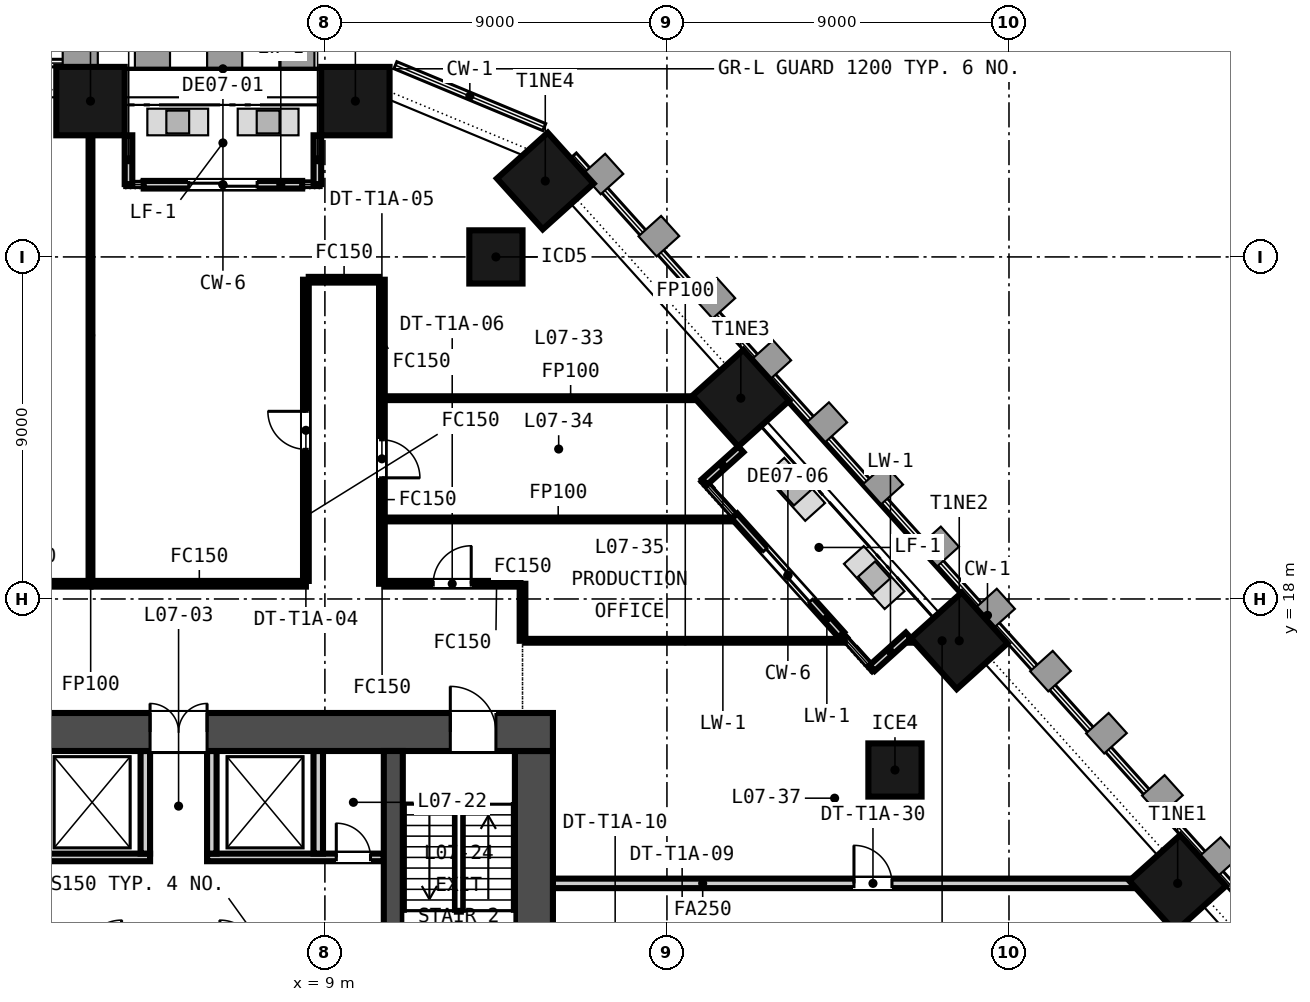
"""IFC4 building model, lengths in metres.
Left out: names, types, materials, properties, quantities, classifications, styles, units other than length and angle.
Written with IfcOpenShell. Run it as: python <this file> out.ifc"""

import sys

from ifc_helpers import new_model, si_unit, direction, frame, frame_2d, origin, origin_2d, place, context, subcontext, project, spatial, rectangle, extrude, element, fill, save


model = new_model("IFC4")
c1 = context("Model", 3, precision=1e-05, world=origin(), true_north=direction((0.0, 1.0)))
c2 = subcontext(c1, "Body", "Model", "MODEL_VIEW")
j1 = project(units=[si_unit("LENGTHUNIT", "METRE"), si_unit("PLANEANGLEUNIT", "RADIAN")], contexts=[c1])
p1 = place(None, origin())
s1 = spatial("IfcSite", under=j1, at=p1, CompositionType="ELEMENT")
p2 = place(p1, origin())
s2 = spatial("IfcBuilding", under=s1, at=p2, CompositionType="ELEMENT")
p3 = place(p2, frame((0.0, 0.0, 39.65)))
s3 = spatial("IfcBuildingStorey", under=s2, at=p3, CompositionType="ELEMENT", Elevation=39.65)
p4 = place(p3, frame((-15.0, 14.5, -0.15), z_axis=(0.0, 0.0, 1.0), x_axis=(1.0, 0.0, 0.0)))
e1 = element("IfcWall", 1, at=p4, inside=s3, PredefinedType="SOLIDWALL", context=c2, shape_type="SweptSolid", body=[
    extrude(rectangle(XDim=30.0, YDim=1.0, at=frame_2d((15.0, 0.0))), origin(), (0.0, 0.0, 1.0), 3.65),
])
p5 = place(p4, frame((9.25, 0.0, 0.15)))
e2 = element("IfcOpeningElement", 2, at=p5, cuts=e1, PredefinedType="OPENING", context=c2, shape_type="SweptSolid", body=[
    extrude(rectangle(XDim=1.5, YDim=2.1, at=frame_2d((0.75, 1.05))), frame((0.0, 0.51, 0.0), z_axis=(0.0, -1.0, 0.0), x_axis=(1.0, 0.0, 0.0)), (0.0, 0.0, 1.0), 1.02),
])
p6 = place(p4, frame((19.4, 0.0, 0.15)))
e3 = element("IfcOpeningElement", 3, at=p6, cuts=e1, PredefinedType="OPENING", context=c2, shape_type="SweptSolid", body=[
    extrude(rectangle(XDim=1.5, YDim=2.1, at=frame_2d((0.75, 1.05))), frame((0.0, 0.51, 0.0), z_axis=(0.0, -1.0, 0.0), x_axis=(1.0, 0.0, 0.0)), (0.0, 0.0, 1.0), 1.02),
])
p7 = place(p4, frame((1.5, 0.0, 0.15)))
e4 = element("IfcOpeningElement", 4, at=p7, cuts=e1, PredefinedType="OPENING", context=c2, shape_type="SweptSolid", body=[
    extrude(rectangle(XDim=1.2, YDim=2.1, at=frame_2d((0.6, 1.05))), frame((0.0, 0.51, 0.0), z_axis=(0.0, -1.0, 0.0), x_axis=(1.0, 0.0, 0.0)), (0.0, 0.0, 1.0), 1.02),
])
p8 = place(p4, frame((27.3, 0.0, 0.15)))
e5 = element("IfcOpeningElement", 5, at=p8, cuts=e1, PredefinedType="OPENING", context=c2, shape_type="SweptSolid", body=[
    extrude(rectangle(XDim=1.2, YDim=2.1, at=frame_2d((0.6, 1.05))), frame((0.0, 0.51, 0.0), z_axis=(0.0, -1.0, 0.0), x_axis=(1.0, 0.0, 0.0)), (0.0, 0.0, 1.0), 1.02),
])
p9 = place(p3, frame((14.5, 1.0, -0.15), z_axis=(0.0, 0.0, 1.0), x_axis=(0.0, 1.0, 0.0)))
e6 = element("IfcWall", 6, at=p9, inside=s3, PredefinedType="SOLIDWALL", context=c2, shape_type="SweptSolid", body=[
    extrude(rectangle(XDim=13.0, YDim=1.0, at=frame_2d((6.5, 0.0))), origin(), (0.0, 0.0, 1.0), 3.65),
])
p10 = place(p3, frame((10.8, 1.0, -0.15), z_axis=(0.0, 0.0, 1.0), x_axis=(0.0, 1.0, 0.0)))
e7 = element("IfcWall", 7, at=p10, inside=s3, PredefinedType="SOLIDWALL", context=c2, shape_type="SweptSolid", body=[
    extrude(rectangle(XDim=13.0, YDim=0.5, at=frame_2d((6.5, 0.0))), origin(), (0.0, 0.0, 1.0), 3.65),
])
for number, where, z_axis, x_axis in (
    (8, (9.802, 31.1, -0.15), (0.0, 0.0, 1.0), (-1.0, 0.0, 0.0)),
    (9, (2.832, 31.1, -0.15), (0.0, 0.0, 1.0), (-1.0, 0.0, 0.0)),
    (10, (31.438, 10.517, -0.15), (0.0, 0.0, 1.0), (-0.669, 0.743, 0.0)),
    (11, (25.691, 16.9, -0.15), (0.0, 0.0, 1.0), (-0.669, 0.743, 0.0)),
    (12, (19.944, 23.283, -0.15), (0.0, 0.0, 1.0), (-0.669, 0.743, 0.0)),
    (13, (14.799, 28.998, -0.15), (0.0, 0.0, 1.0), (-0.669, 0.743, 0.0)),
):
    element("IfcColumn", number, at=place(p3, frame(where, z_axis=z_axis, x_axis=x_axis)), inside=s3, PredefinedType="COLUMN", context=c2, shape_type="SweptSolid", body=[
        extrude(rectangle(XDim=1.8, YDim=1.8, at=origin_2d()), origin(), (0.0, 0.0, 1.0), 3.65),
    ])
for number, where, z_axis, x_axis in (
    (14, (13.5, 27.0, -0.15), (0.0, 0.0, 1.0), (1.0, 0.0, 0.0)),
    (15, (24.0, 13.5, -0.15), (0.0, 0.0, 1.0), (1.0, 0.0, 0.0)),
):
    element("IfcColumn", number, at=place(p3, frame(where, z_axis=z_axis, x_axis=x_axis)), inside=s3, PredefinedType="COLUMN", context=c2, shape_type="SweptSolid", body=[
        extrude(rectangle(XDim=1.4, YDim=1.4, at=origin_2d()), origin(), (0.0, 0.0, 1.0), 3.65),
    ])
p11 = place(p3, frame((8.402, 28.9, 0.0), z_axis=(0.0, 0.0, 1.0), x_axis=(-1.0, 0.0, 0.0)))
e16 = element("IfcWall", 16, at=p11, inside=s3, PredefinedType="SOLIDWALL", context=c2, shape_type="SweptSolid", body=[
    extrude(rectangle(XDim=4.169, YDim=0.2, at=frame_2d((2.085, 0.0))), origin(), (0.0, 0.0, 1.0), 3.049),
])
p12 = place(p11, frame((1.185, 0.0, 0.0)))
e17 = element("IfcOpeningElement", 17, at=p12, cuts=e16, PredefinedType="OPENING", context=c2, shape_type="SweptSolid", body=[
    extrude(rectangle(XDim=1.8, YDim=2.4, at=frame_2d((0.9, 1.2))), frame((0.0, 0.11, 0.0), z_axis=(0.0, -1.0, 0.0), x_axis=(1.0, 0.0, 0.0)), (0.0, 0.0, 1.0), 0.22),
])
for number, where, z_axis, x_axis in (
    (18, (8.802, 30.2, 0.0), (0.0, 0.0, 1.0), (0.0, -1.0, 0.0)),
    (19, (3.832, 30.2, 0.0), (0.0, 0.0, 1.0), (0.0, -1.0, 0.0)),
):
    element("IfcWall", number, at=place(p3, frame(where, z_axis=z_axis, x_axis=x_axis)), inside=s3, PredefinedType="SOLIDWALL", context=c2, shape_type="SweptSolid", body=[
        extrude(rectangle(XDim=1.284, YDim=0.2, at=frame_2d((0.642, 0.0))), origin(), (0.0, 0.0, 1.0), 3.05),
    ])
p13 = place(p3, frame((22.588, 17.059, 0.0), z_axis=(0.0, 0.0, 1.0), x_axis=(-0.669138140895, 0.743138041282, 0.0)))
e20 = element("IfcWall", 20, at=p13, inside=s3, PredefinedType="SOLIDWALL", context=c2, shape_type="SweptSolid", body=[
    extrude(rectangle(XDim=4.2, YDim=0.2, at=frame_2d((2.1, 0.0))), origin(), (0.0, 0.0, 1.0), 3.05),
])
p14 = place(p13, frame((1.2, 0.0, 0.0)))
e21 = element("IfcOpeningElement", 21, at=p14, cuts=e20, PredefinedType="OPENING", context=c2, shape_type="SweptSolid", body=[
    extrude(rectangle(XDim=1.8, YDim=2.4, at=frame_2d((0.9, 1.2))), frame((0.0, 0.11, 0.0), z_axis=(0.0, -1.0, 0.0), x_axis=(1.0, 0.0, 0.0)), (0.0, 0.0, 1.0), 0.22),
])
p15 = place(p3, frame((24.353, 17.041, 0.0), z_axis=(0.0, 0.0, 1.0), x_axis=(-0.743123928629, -0.669153813932, 0.0)))
e22 = element("IfcWall", 22, at=p15, inside=s3, PredefinedType="SOLIDWALL", context=c2, shape_type="SweptSolid", body=[
    extrude(rectangle(XDim=1.284, YDim=0.2, at=frame_2d((0.642, 0.0))), origin(), (0.0, 0.0, 1.0), 2.821),
])
p16 = place(p3, frame((19.944, 21.938, 0.0), z_axis=(0.0, 0.0, 1.0), x_axis=(-0.743029376197, -0.669258803535, 0.0)))
e23 = element("IfcWall", 23, at=p16, inside=s3, PredefinedType="SOLIDWALL", context=c2, shape_type="SweptSolid", body=[
    extrude(rectangle(XDim=1.284, YDim=0.2, at=frame_2d((0.642, 0.0))), origin(), (0.0, 0.0, 1.0), 3.05),
])
p17 = place(p3, frame((-4.25, 11.2, 0.0), z_axis=(0.0, 0.0, 1.0), x_axis=(1.0, 0.0, 0.0)))
e24 = element("IfcWall", 24, at=p17, inside=s3, PredefinedType="PARTITIONING", context=c2, shape_type="SweptSolid", body=[
    extrude(rectangle(XDim=8.65, YDim=0.2, at=frame_2d((4.325, 0.0))), origin(), (0.0, 0.0, 1.0), 3.5),
])
p18 = place(p17, frame((0.825, 0.0, 0.0)))
e25 = element("IfcOpeningElement", 25, at=p18, cuts=e24, PredefinedType="OPENING", context=c2, shape_type="SweptSolid", body=[
    extrude(rectangle(XDim=1.4, YDim=2.1, at=frame_2d((0.7, 1.05))), frame((0.0, 0.11, 0.0), z_axis=(0.0, -1.0, 0.0), x_axis=(1.0, 0.0, 0.0)), (0.0, 0.0, 1.0), 0.22),
])
p19 = place(p17, frame((3.625, 0.0, 0.0)))
e26 = element("IfcOpeningElement", 26, at=p19, cuts=e24, PredefinedType="OPENING", context=c2, shape_type="SweptSolid", body=[
    extrude(rectangle(XDim=1.4, YDim=2.1, at=frame_2d((0.7, 1.05))), frame((0.0, 0.11, 0.0), z_axis=(0.0, -1.0, 0.0), x_axis=(1.0, 0.0, 0.0)), (0.0, 0.0, 1.0), 0.22),
])
p20 = place(p3, frame((5.9, 11.2, 0.0), z_axis=(0.0, 0.0, 1.0), x_axis=(1.0, 0.0, 0.0)))
e27 = element("IfcWall", 27, at=p20, inside=s3, PredefinedType="PARTITIONING", context=c2, shape_type="SweptSolid", body=[
    extrude(rectangle(XDim=4.65, YDim=0.2, at=frame_2d((2.325, 0.0))), origin(), (0.0, 0.0, 1.0), 3.5),
])
p21 = place(p20, frame((3.4, 0.0, 0.0)))
e28 = element("IfcOpeningElement", 28, at=p21, cuts=e27, PredefinedType="OPENING", context=c2, shape_type="SweptSolid", body=[
    extrude(rectangle(XDim=0.9, YDim=2.1, at=frame_2d((0.45, 1.05))), frame((0.0, 0.11, 0.0), z_axis=(0.0, -1.0, 0.0), x_axis=(1.0, 0.0, 0.0)), (0.0, 0.0, 1.0), 0.22),
])
for number, where, z_axis, x_axis in (
    (29, (4.275, 11.3, 0.0), (0.0, 0.0, 1.0), (0.0, 1.0, 0.0)),
    (30, (6.025, 11.3, 0.0), (0.0, 0.0, 1.0), (0.0, 1.0, 0.0)),
    (31, (8.825, 11.3, 0.0), (0.0, 0.0, 1.0), (0.0, 1.0, 0.0)),
):
    element("IfcWall", number, at=place(p3, frame(where, z_axis=z_axis, x_axis=x_axis)), inside=s3, PredefinedType="PARTITIONING", context=c2, shape_type="SweptSolid", body=[
        extrude(rectangle(XDim=2.7, YDim=0.25, at=frame_2d((1.35, 0.0))), origin(), (0.0, 0.0, 1.0), 3.5),
    ])
p22 = place(p3, frame((10.5, 26.4, 0.0), z_axis=(0.0, 0.0, 1.0), x_axis=(0.0, -1.0, 0.0)))
e32 = element("IfcWall", 32, at=p22, inside=s3, PredefinedType="PARTITIONING", context=c2, shape_type="SweptSolid", body=[
    extrude(rectangle(XDim=3.117, YDim=0.15, at=frame_2d((1.559, 0.0))), origin(), (0.0, 0.0, 1.0), 2.741),
])
p23 = place(p3, frame((10.5, 23.283, 0.0), z_axis=(0.0, 0.0, 1.0), x_axis=(0.0, -1.0, 0.0)))
e33 = element("IfcWall", 33, at=p23, inside=s3, PredefinedType="PARTITIONING", context=c2, shape_type="SweptSolid", body=[
    extrude(rectangle(XDim=3.191, YDim=0.15, at=frame_2d((1.595, 0.0))), origin(), (0.0, 0.0, 1.0), 2.741),
])
p24 = place(p23, frame((1.095, 0.0, 0.0)))
e34 = element("IfcOpeningElement", 34, at=p24, cuts=e33, PredefinedType="OPENING", context=c2, shape_type="SweptSolid", body=[
    extrude(rectangle(XDim=1.0, YDim=2.1, at=frame_2d((0.5, 1.05))), frame((0.0, 0.085, 0.0), z_axis=(0.0, -1.0, 0.0), x_axis=(1.0, 0.0, 0.0)), (0.0, 0.0, 1.0), 0.17),
])
p25 = place(p3, frame((10.5, 20.092, 0.0), z_axis=(0.0, 0.0, 1.0), x_axis=(0.0, -1.0, 0.0)))
e35 = element("IfcWall", 35, at=p25, inside=s3, PredefinedType="PARTITIONING", context=c2, shape_type="SweptSolid", body=[
    extrude(rectangle(XDim=1.692, YDim=0.15, at=frame_2d((0.846, 0.0))), origin(), (0.0, 0.0, 1.0), 2.741),
])
p26 = place(p3, frame((14.2, 18.4, 0.0), z_axis=(0.0, 0.0, 1.0), x_axis=(0.0, -1.0, 0.0)))
e36 = element("IfcWall", 36, at=p26, inside=s3, PredefinedType="PARTITIONING", context=c2, shape_type="SweptSolid", body=[
    extrude(rectangle(XDim=1.5, YDim=0.15, at=frame_2d((0.75, 0.0))), origin(), (0.0, 0.0, 1.0), 2.741),
])
p27 = place(p3, frame((-4.987, 18.4, 0.0), z_axis=(0.0, 0.0, 1.0), x_axis=(1.0, 0.0, 0.0)))
e37 = element("IfcWall", 37, at=p27, inside=s3, PredefinedType="PARTITIONING", context=c2, shape_type="SweptSolid", body=[
    extrude(rectangle(XDim=7.819, YDim=0.15, at=frame_2d((3.91, 0.0))), origin(), (0.0, 0.0, 1.0), 2.741),
])
p28 = place(p27, frame((3.409, 0.0, 0.0)))
e38 = element("IfcOpeningElement", 38, at=p28, cuts=e37, PredefinedType="OPENING", context=c2, shape_type="SweptSolid", body=[
    extrude(rectangle(XDim=1.0, YDim=2.1, at=frame_2d((0.5, 1.05))), frame((0.0, 0.085, 0.0), z_axis=(0.0, -1.0, 0.0), x_axis=(1.0, 0.0, 0.0)), (0.0, 0.0, 1.0), 0.17),
])
p29 = place(p3, frame((2.832, 18.475, 0.0), z_axis=(0.0, 0.0, 1.0), x_axis=(0.0, 1.0, 0.0)))
e39 = element("IfcWall", 39, at=p29, inside=s3, PredefinedType="PARTITIONING", context=c2, shape_type="SweptSolid", body=[
    extrude(rectangle(XDim=12.925, YDim=0.1, at=frame_2d((6.462, 0.0))), origin(), (0.0, 0.0, 1.0), 2.741),
])
p30 = place(p3, frame((2.882, 18.4, 0.0), z_axis=(0.0, 0.0, 1.0), x_axis=(1.0, 0.0, 0.0)))
e40 = element("IfcWall", 40, at=p30, inside=s3, PredefinedType="PARTITIONING", context=c2, shape_type="SweptSolid", body=[
    extrude(rectangle(XDim=5.618, YDim=0.15, at=frame_2d((2.809, 0.0))), origin(), (0.0, 0.0, 1.0), 2.741),
])
p31 = place(p3, frame((8.5, 18.475, 0.0), z_axis=(0.0, 0.0, 1.0), x_axis=(0.0, 1.0, 0.0)))
e41 = element("IfcWall", 41, at=p31, inside=s3, PredefinedType="PARTITIONING", context=c2, shape_type="SweptSolid", body=[
    extrude(rectangle(XDim=7.925, YDim=0.15, at=frame_2d((3.962, 0.0))), origin(), (0.0, 0.0, 1.0), 2.741),
])
p32 = place(p31, frame((3.462, 0.0, 0.0)))
e42 = element("IfcOpeningElement", 42, at=p32, cuts=e41, PredefinedType="OPENING", context=c2, shape_type="SweptSolid", body=[
    extrude(rectangle(XDim=1.0, YDim=2.1, at=frame_2d((0.5, 1.05))), frame((0.0, 0.085, 0.0), z_axis=(0.0, -1.0, 0.0), x_axis=(1.0, 0.0, 0.0)), (0.0, 0.0, 1.0), 0.17),
])
p33 = place(p3, frame((8.575, 26.4, 0.0), z_axis=(0.0, 0.0, 1.0), x_axis=(1.0, 0.0, 0.0)))
e43 = element("IfcWall", 43, at=p33, inside=s3, PredefinedType="PARTITIONING", context=c2, shape_type="SweptSolid", body=[
    extrude(rectangle(XDim=1.85, YDim=0.15, at=frame_2d((0.925, 0.0))), origin(), (0.0, 0.0, 1.0), 2.741),
])
p34 = place(p3, frame((10.575, 23.283, 0.0), z_axis=(0.0, 0.0, 1.0), x_axis=(1.0, 0.0, 0.0)))
e44 = element("IfcWall", 44, at=p34, inside=s3, PredefinedType="PARTITIONING", context=c2, shape_type="SweptSolid", body=[
    extrude(rectangle(XDim=9.772, YDim=0.1, at=frame_2d((4.886, 0.0))), origin(), (0.0, 0.0, 1.0), 2.741),
])
p35 = place(p3, frame((10.575, 20.092, 0.0), z_axis=(0.0, 0.0, 1.0), x_axis=(1.0, 0.0, 0.0)))
e45 = element("IfcWall", 45, at=p35, inside=s3, PredefinedType="PARTITIONING", context=c2, shape_type="SweptSolid", body=[
    extrude(rectangle(XDim=9.117, YDim=0.1, at=frame_2d((4.559, 0.0))), origin(), (0.0, 0.0, 1.0), 2.741),
])
p36 = place(p3, frame((10.575, 18.4, 0.0), z_axis=(0.0, 0.0, 1.0), x_axis=(1.0, 0.0, 0.0)))
e46 = element("IfcWall", 46, at=p36, inside=s3, PredefinedType="PARTITIONING", context=c2, shape_type="SweptSolid", body=[
    extrude(rectangle(XDim=3.55, YDim=0.15, at=frame_2d((1.775, 0.0))), origin(), (0.0, 0.0, 1.0), 2.741),
])
p37 = place(p36, frame((1.275, 0.0, 0.0)))
e47 = element("IfcOpeningElement", 47, at=p37, cuts=e46, PredefinedType="OPENING", context=c2, shape_type="SweptSolid", body=[
    extrude(rectangle(XDim=1.0, YDim=2.1, at=frame_2d((0.5, 1.05))), frame((0.0, 0.085, 0.0), z_axis=(0.0, -1.0, 0.0), x_axis=(1.0, 0.0, 0.0)), (0.0, 0.0, 1.0), 0.17),
])
p38 = place(p3, frame((14.275, 16.9, 0.0), z_axis=(0.0, 0.0, 1.0), x_axis=(1.0, 0.0, 0.0)))
e48 = element("IfcWall", 48, at=p38, inside=s3, PredefinedType="PARTITIONING", context=c2, shape_type="SweptSolid", body=[
    extrude(rectangle(XDim=8.405, YDim=0.1, at=frame_2d((4.202, 0.0))), origin(), (0.0, 0.0, 1.0), 2.741),
])
p39 = place(p3, frame((24.375, 16.9, 0.0), z_axis=(0.0, 0.0, 1.0), x_axis=(1.0, 0.0, 0.0)))
e49 = element("IfcWall", 49, at=p39, inside=s3, PredefinedType="PARTITIONING", context=c2, shape_type="SweptSolid", body=[
    extrude(rectangle(XDim=1.719, YDim=0.1, at=frame_2d((0.86, 0.0))), origin(), (0.0, 0.0, 1.0), 2.741),
])
p40 = place(p3, frame((15.0, 10.517, 0.0), z_axis=(0.0, 0.0, 1.0), x_axis=(1.0, 0.0, 0.0)))
e50 = element("IfcWall", 50, at=p40, inside=s3, PredefinedType="PARTITIONING", context=c2, shape_type="SweptSolid", body=[
    extrude(rectangle(XDim=16.842, YDim=0.25, at=frame_2d((8.421, 0.0))), origin(), (0.0, 0.0, 1.0), 2.741),
])
p41 = place(p40, frame((7.921, 0.0, 0.0)))
e51 = element("IfcOpeningElement", 51, at=p41, cuts=e50, PredefinedType="OPENING", context=c2, shape_type="SweptSolid", body=[
    extrude(rectangle(XDim=1.0, YDim=2.1, at=frame_2d((0.5, 1.05))), frame((0.0, 0.135, 0.0), z_axis=(0.0, -1.0, 0.0), x_axis=(1.0, 0.0, 0.0)), (0.0, 0.0, 1.0), 0.27),
])
p42 = place(p12, origin())
e52 = element("IfcDoor", 52, at=p42, inside=s3, OperationType="SINGLE_SWING_LEFT", PredefinedType="DOOR", context=c2, shape_type="SweptSolid", body=[
    extrude(rectangle(XDim=1.8, YDim=2.4, at=frame_2d((0.9, 1.2))), frame((0.0, 0.025, 0.0), z_axis=(0.0, -1.0, 0.0), x_axis=(1.0, 0.0, 0.0)), (0.0, 0.0, 1.0), 0.05),
])
fill(e17, e52)
p43 = place(p14, origin())
e53 = element("IfcDoor", 53, at=p43, inside=s3, OperationType="SINGLE_SWING_LEFT", PredefinedType="DOOR", context=c2, shape_type="SweptSolid", body=[
    extrude(rectangle(XDim=1.8, YDim=2.4, at=frame_2d((0.9, 1.2))), frame((0.0, 0.025, 0.0), z_axis=(0.0, -1.0, 0.0), x_axis=(1.0, 0.0, 0.0)), (0.0, 0.0, 1.0), 0.05),
])
fill(e21, e53)
p44 = place(p21, origin())
e54 = element("IfcDoor", 54, at=p44, inside=s3, OperationType="SINGLE_SWING_LEFT", PredefinedType="DOOR", context=c2, shape_type="SweptSolid", body=[
    extrude(rectangle(XDim=0.9, YDim=2.1, at=frame_2d((0.45, 1.05))), frame((0.0, 0.025, 0.0), z_axis=(0.0, -1.0, 0.0), x_axis=(1.0, 0.0, 0.0)), (0.0, 0.0, 1.0), 0.05),
])
fill(e28, e54)
p45 = place(p6, origin())
e55 = element("IfcDoor", 55, at=p45, inside=s3, OperationType="DOUBLE_DOOR_SINGLE_SWING", PredefinedType="DOOR", context=c2, shape_type="SweptSolid", body=[
    extrude(rectangle(XDim=1.5, YDim=2.1, at=frame_2d((0.75, 1.05))), frame((0.0, 0.025, 0.0), z_axis=(0.0, -1.0, 0.0), x_axis=(1.0, 0.0, 0.0)), (0.0, 0.0, 1.0), 0.05),
])
fill(e3, e55)
p46 = place(p8, origin())
e56 = element("IfcDoor", 56, at=p46, inside=s3, OperationType="SINGLE_SWING_LEFT", PredefinedType="DOOR", context=c2, shape_type="SweptSolid", body=[
    extrude(rectangle(XDim=1.2, YDim=2.1, at=frame_2d((0.6, 1.05))), frame((0.0, 0.025, 0.0), z_axis=(0.0, -1.0, 0.0), x_axis=(1.0, 0.0, 0.0)), (0.0, 0.0, 1.0), 0.05),
])
fill(e5, e56)
p47 = place(p32, origin())
e57 = element("IfcDoor", 57, at=p47, inside=s3, OperationType="SINGLE_SWING_RIGHT", PredefinedType="DOOR", context=c2, shape_type="SweptSolid", body=[
    extrude(rectangle(XDim=1.0, YDim=2.1, at=frame_2d((0.5, 1.05))), frame((0.0, 0.025, 0.0), z_axis=(0.0, -1.0, 0.0), x_axis=(1.0, 0.0, 0.0)), (0.0, 0.0, 1.0), 0.05),
])
fill(e42, e57)
p48 = place(p24, origin())
e58 = element("IfcDoor", 58, at=p48, inside=s3, OperationType="SINGLE_SWING_RIGHT", PredefinedType="DOOR", context=c2, shape_type="SweptSolid", body=[
    extrude(rectangle(XDim=1.0, YDim=2.1, at=frame_2d((0.5, 1.05))), frame((0.0, 0.025, 0.0), z_axis=(0.0, -1.0, 0.0), x_axis=(1.0, 0.0, 0.0)), (0.0, 0.0, 1.0), 0.05),
])
fill(e34, e58)
p49 = place(p37, origin())
e59 = element("IfcDoor", 59, at=p49, inside=s3, OperationType="SINGLE_SWING_RIGHT", PredefinedType="DOOR", context=c2, shape_type="SweptSolid", body=[
    extrude(rectangle(XDim=1.0, YDim=2.1, at=frame_2d((0.5, 1.05))), frame((0.0, 0.025, 0.0), z_axis=(0.0, -1.0, 0.0), x_axis=(1.0, 0.0, 0.0)), (0.0, 0.0, 1.0), 0.05),
])
fill(e47, e59)
p50 = place(p41, origin())
e60 = element("IfcDoor", 60, at=p50, inside=s3, OperationType="SINGLE_SWING_LEFT", PredefinedType="DOOR", context=c2, shape_type="SweptSolid", body=[
    extrude(rectangle(XDim=1.0, YDim=2.1, at=frame_2d((0.5, 1.05))), frame((0.0, 0.025, 0.0), z_axis=(0.0, -1.0, 0.0), x_axis=(1.0, 0.0, 0.0)), (0.0, 0.0, 1.0), 0.05),
])
fill(e51, e60)
save(model, sys.argv[1])
